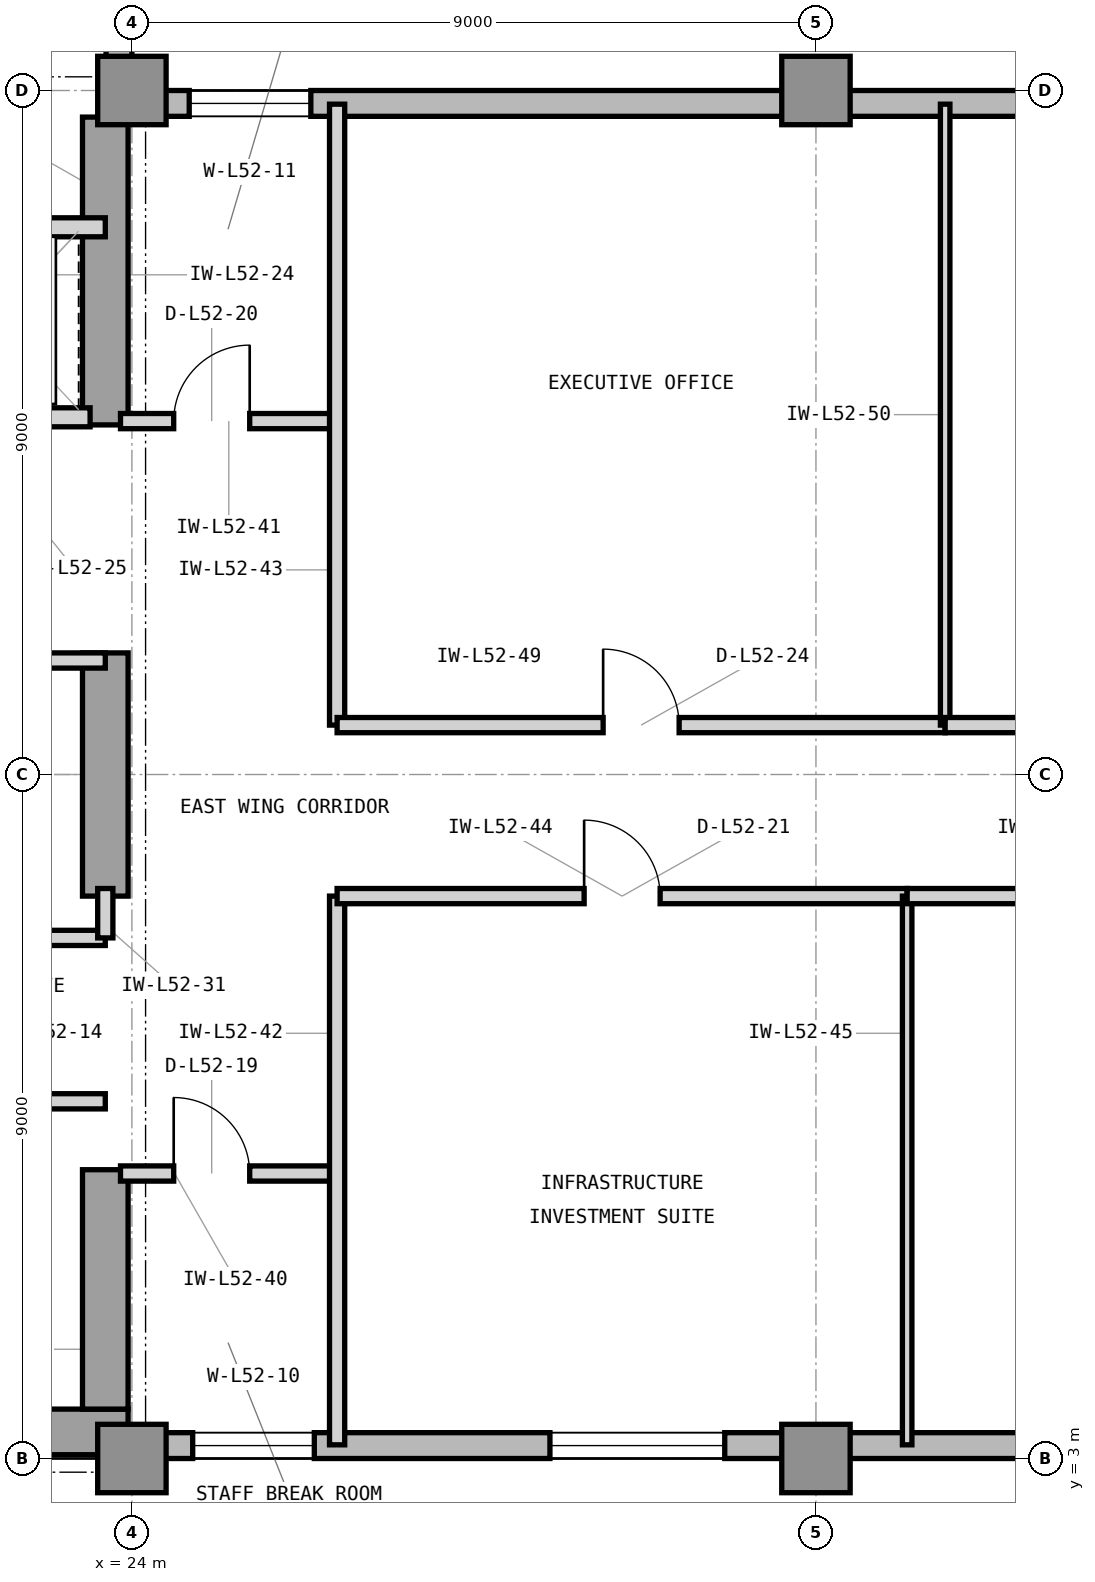
"""IFC4 building model, lengths in metres.
Left out: names, types, materials, properties, quantities, classifications, styles, units other than length and angle.
Written with IfcOpenShell. Run it as: python <this file> out.ifc"""

import sys

from ifc_helpers import new_model, si_unit, direction, frame, frame_2d, origin, origin_2d, place, context, subcontext, project, spatial, rectangle, extrude, element, fill, save


model = new_model("IFC4")
c1 = context("Model", 3, precision=1e-05, world=origin(), true_north=direction((0.0, 1.0)))
c2 = subcontext(c1, "Body", "Model", "MODEL_VIEW")
j1 = project(units=[si_unit("LENGTHUNIT", "METRE"), si_unit("PLANEANGLEUNIT", "RADIAN")], contexts=[c1])
p1 = place(None, origin())
s1 = spatial("IfcSite", under=j1, at=p1, CompositionType="ELEMENT")
p2 = place(p1, origin())
s2 = spatial("IfcBuilding", under=s1, at=p2, CompositionType="ELEMENT")
p3 = place(p2, frame((0.0, 0.0, 215.1)))
s3 = spatial("IfcBuildingStorey", under=s2, at=p3, CompositionType="ELEMENT", Elevation=215.1)
p4 = place(p3, frame((7.475, 3.35, 0.0), z_axis=(0.0, 0.0, 1.0), x_axis=(1.0, 0.0, 0.0)))
e1 = element("IfcWall", 1, at=p4, inside=s3, PredefinedType="SHEAR", context=c2, shape_type="SweptSolid", body=[
    extrude(rectangle(XDim=16.475, YDim=0.6, at=frame_2d((8.237, 0.0))), origin(), (0.0, 0.0, 1.0), 3.9),
])
p5 = place(p3, frame((23.65, 3.65, 0.0), z_axis=(0.0, 0.0, 1.0), x_axis=(0.0, 1.0, 0.0)))
e2 = element("IfcWall", 2, at=p5, inside=s3, PredefinedType="SHEAR", context=c2, shape_type="SweptSolid", body=[
    extrude(rectangle(XDim=3.15, YDim=0.6, at=frame_2d((1.575, 0.0))), origin(), (0.0, 0.0, 1.0), 3.9),
])
p6 = place(p3, frame((23.65, 10.4, 0.0), z_axis=(0.0, 0.0, 1.0), x_axis=(0.0, 1.0, 0.0)))
e3 = element("IfcWall", 3, at=p6, inside=s3, PredefinedType="SHEAR", context=c2, shape_type="SweptSolid", body=[
    extrude(rectangle(XDim=3.2, YDim=0.6, at=frame_2d((1.6, 0.0))), origin(), (0.0, 0.0, 1.0), 3.9),
])
p7 = place(p3, frame((23.65, 16.6, 0.0), z_axis=(0.0, 0.0, 1.0), x_axis=(0.0, 1.0, 0.0)))
e4 = element("IfcWall", 4, at=p7, inside=s3, PredefinedType="SHEAR", context=c2, shape_type="SweptSolid", body=[
    extrude(rectangle(XDim=4.05, YDim=0.6, at=frame_2d((2.025, 0.0))), origin(), (0.0, 0.0, 1.0), 3.9),
])
for number, where, z_axis, x_axis in (
    (5, (24.0, 3.0, 0.0), (0.0, 0.0, 1.0), (1.0, 0.0, 0.0)),
    (6, (24.0, 21.0, 0.0), (0.0, 0.0, 1.0), (1.0, 0.0, 0.0)),
    (7, (33.0, 3.0, 0.0), (0.0, 0.0, 1.0), (1.0, 0.0, 0.0)),
    (8, (33.0, 21.0, 0.0), (0.0, 0.0, 1.0), (1.0, 0.0, 0.0)),
):
    element("IfcColumn", number, at=place(p3, frame(where, z_axis=z_axis, x_axis=x_axis)), inside=s3, PredefinedType="COLUMN", context=c2, shape_type="SweptSolid", body=[
        extrude(rectangle(XDim=0.9, YDim=0.9, at=origin_2d()), origin(), (0.0, 0.0, 1.0), 3.9),
    ])
p8 = place(p3, frame((23.9, 3.17, 0.0), z_axis=(0.0, 0.0, 1.0), x_axis=(1.0, 0.0, 0.0)))
e9 = element("IfcWall", 9, at=p8, inside=s3, PredefinedType="STANDARD", context=c2, shape_type="SweptSolid", body=[
    extrude(rectangle(XDim=31.5, YDim=0.34, at=frame_2d((15.75, 0.0))), origin(), (0.0, 0.0, 1.0), 3.7),
])
p9 = place(p8, frame((5.6, 0.0, 0.9)))
e10 = element("IfcOpeningElement", 10, at=p9, cuts=e9, PredefinedType="OPENING", context=c2, shape_type="SweptSolid", body=[
    extrude(rectangle(XDim=2.3, YDim=2.2, at=frame_2d((1.15, 1.1))), frame((0.0, 0.18, 0.0), z_axis=(0.0, -1.0, 0.0), x_axis=(1.0, 0.0, 0.0)), (0.0, 0.0, 1.0), 0.36),
])
p10 = place(p8, frame((14.6, 0.0, 0.9)))
e11 = element("IfcOpeningElement", 11, at=p10, cuts=e9, PredefinedType="OPENING", context=c2, shape_type="SweptSolid", body=[
    extrude(rectangle(XDim=2.3, YDim=2.2, at=frame_2d((1.15, 1.1))), frame((0.0, 0.18, 0.0), z_axis=(0.0, -1.0, 0.0), x_axis=(1.0, 0.0, 0.0)), (0.0, 0.0, 1.0), 0.36),
])
p11 = place(p8, frame((19.1, 0.0, 0.9)))
e12 = element("IfcOpeningElement", 12, at=p11, cuts=e9, PredefinedType="OPENING", context=c2, shape_type="SweptSolid", body=[
    extrude(rectangle(XDim=2.3, YDim=2.2, at=frame_2d((1.15, 1.1))), frame((0.0, 0.18, 0.0), z_axis=(0.0, -1.0, 0.0), x_axis=(1.0, 0.0, 0.0)), (0.0, 0.0, 1.0), 0.36),
])
p12 = place(p8, frame((0.9, 0.0, 0.9)))
e13 = element("IfcOpeningElement", 13, at=p12, cuts=e9, PredefinedType="OPENING", context=c2, shape_type="SweptSolid", body=[
    extrude(rectangle(XDim=1.6, YDim=2.2, at=frame_2d((0.8, 1.1))), frame((0.0, 0.18, 0.0), z_axis=(0.0, -1.0, 0.0), x_axis=(1.0, 0.0, 0.0)), (0.0, 0.0, 1.0), 0.36),
])
p13 = place(p3, frame((55.4, 20.83, 0.0), z_axis=(0.0, 0.0, 1.0), x_axis=(-1.0, 0.0, 0.0)))
e14 = element("IfcWall", 14, at=p13, inside=s3, PredefinedType="STANDARD", context=c2, shape_type="SweptSolid", body=[
    extrude(rectangle(XDim=31.4, YDim=0.34, at=frame_2d((15.7, 0.0))), origin(), (0.0, 0.0, 1.0), 3.7),
])
p14 = place(p13, frame((17.167, 0.0, 0.9)))
e15 = element("IfcOpeningElement", 15, at=p14, cuts=e14, PredefinedType="OPENING", context=c2, shape_type="SweptSolid", body=[
    extrude(rectangle(XDim=2.3, YDim=2.2, at=frame_2d((1.15, 1.1))), frame((0.0, 0.18, 0.0), z_axis=(0.0, -1.0, 0.0), x_axis=(1.0, 0.0, 0.0)), (0.0, 0.0, 1.0), 0.36),
])
p15 = place(p13, frame((29.046, 0.0, 0.9)))
e16 = element("IfcOpeningElement", 16, at=p15, cuts=e14, PredefinedType="OPENING", context=c2, shape_type="SweptSolid", body=[
    extrude(rectangle(XDim=1.6, YDim=2.2, at=frame_2d((0.8, 1.1))), frame((0.0, 0.18, 0.0), z_axis=(0.0, -1.0, 0.0), x_axis=(1.0, 0.0, 0.0)), (0.0, 0.0, 1.0), 0.36),
])
p16 = place(p13, frame((8.925, 0.0, 0.9)))
e17 = element("IfcOpeningElement", 17, at=p16, cuts=e14, PredefinedType="OPENING", context=c2, shape_type="SweptSolid", body=[
    extrude(rectangle(XDim=2.3, YDim=2.2, at=frame_2d((1.15, 1.1))), frame((0.0, 0.18, 0.0), z_axis=(0.0, -1.0, 0.0), x_axis=(1.0, 0.0, 0.0)), (0.0, 0.0, 1.0), 0.36),
])
p17 = place(p3, frame((23.83, 21.0, 0.0), z_axis=(0.0, 0.0, 1.0), x_axis=(0.0, 1.0, 0.0)))
e18 = element("IfcWall", 18, at=p17, inside=s3, PredefinedType="STANDARD", context=c2, shape_type="SweptSolid", body=[
    extrude(rectangle(XDim=19.4, YDim=0.34, at=frame_2d((9.7, 0.0))), origin(), (0.0, 0.0, 1.0), 3.7),
])
p18 = place(p17, frame((10.975, 0.0, 0.9)))
e19 = element("IfcOpeningElement", 19, at=p18, cuts=e18, PredefinedType="OPENING", context=c2, shape_type="SweptSolid", body=[
    extrude(rectangle(XDim=2.3, YDim=2.2, at=frame_2d((1.15, 1.1))), frame((0.0, 0.18, 0.0), z_axis=(0.0, -1.0, 0.0), x_axis=(1.0, 0.0, 0.0)), (0.0, 0.0, 1.0), 0.36),
])
p19 = place(p3, frame((21.05, 16.7, 0.0), z_axis=(0.0, 0.0, 1.0), x_axis=(1.0, 0.0, 0.0)))
e20 = element("IfcWall", 20, at=p19, inside=s3, PredefinedType="PARTITIONING", context=c2, shape_type="SweptSolid", body=[
    extrude(rectangle(XDim=2.4, YDim=0.25, at=frame_2d((1.2, 0.0))), origin(), (0.0, 0.0, 1.0), 3.283),
])
p20 = place(p19, frame((0.52, 0.0, 0.0)))
e21 = element("IfcOpeningElement", 21, at=p20, cuts=e20, PredefinedType="OPENING", context=c2, shape_type="SweptSolid", body=[
    extrude(rectangle(XDim=1.15, YDim=2.25, at=frame_2d((0.575, 1.125))), frame((0.0, 0.135, 0.0), z_axis=(0.0, -1.0, 0.0), x_axis=(1.0, 0.0, 0.0)), (0.0, 0.0, 1.0), 0.27),
])
p21 = place(p3, frame((16.45, 19.2, 0.0), z_axis=(0.0, 0.0, 1.0), x_axis=(1.0, 0.0, 0.0)))
e22 = element("IfcWall", 22, at=p21, inside=s3, PredefinedType="PARTITIONING", context=c2, shape_type="SweptSolid", body=[
    extrude(rectangle(XDim=7.2, YDim=0.25, at=frame_2d((3.6, 0.0))), origin(), (0.0, 0.0, 1.0), 3.69),
])
p22 = place(p3, frame((19.15, 7.7, 0.0), z_axis=(0.0, 0.0, 1.0), x_axis=(1.0, 0.0, 0.0)))
e23 = element("IfcWall", 23, at=p22, inside=s3, PredefinedType="PARTITIONING", context=c2, shape_type="SweptSolid", body=[
    extrude(rectangle(XDim=4.5, YDim=0.2, at=frame_2d((2.25, 0.0))), origin(), (0.0, 0.0, 1.0), 3.69),
])
p23 = place(p22, frame((1.75, 0.0, 0.0)))
e24 = element("IfcOpeningElement", 24, at=p23, cuts=e23, PredefinedType="OPENING", context=c2, shape_type="SweptSolid", body=[
    extrude(rectangle(XDim=1.0, YDim=2.15, at=frame_2d((0.5, 1.075))), frame((0.0, 0.11, 0.0), z_axis=(0.0, -1.0, 0.0), x_axis=(1.0, 0.0, 0.0)), (0.0, 0.0, 1.0), 0.22),
])
p24 = place(p3, frame((14.825, 9.85, 0.0), z_axis=(0.0, 0.0, 1.0), x_axis=(1.0, 0.0, 0.0)))
e25 = element("IfcWall", 25, at=p24, inside=s3, PredefinedType="PARTITIONING", context=c2, shape_type="SweptSolid", body=[
    extrude(rectangle(XDim=8.825, YDim=0.2, at=frame_2d((4.413, 0.0))), origin(), (0.0, 0.0, 1.0), 3.69),
])
p25 = place(p3, frame((23.65, 9.85, 0.0), z_axis=(0.0, 0.0, 1.0), x_axis=(0.0, 1.0, 0.0)))
e26 = element("IfcWall", 26, at=p25, inside=s3, PredefinedType="PARTITIONING", context=c2, shape_type="SweptSolid", body=[
    extrude(rectangle(XDim=0.65, YDim=0.2, at=frame_2d((0.325, 0.0))), origin(), (0.0, 0.0, 1.0), 3.69),
])
p26 = place(p3, frame((19.85, 13.5, 0.0), z_axis=(0.0, 0.0, 1.0), x_axis=(1.0, 0.0, 0.0)))
e27 = element("IfcWall", 27, at=p26, inside=s3, PredefinedType="PARTITIONING", context=c2, shape_type="SweptSolid", body=[
    extrude(rectangle(XDim=3.8, YDim=0.2, at=frame_2d((1.9, 0.0))), origin(), (0.0, 0.0, 1.0), 3.283),
])
p27 = place(p26, frame((1.425, 0.0, 0.0)))
e28 = element("IfcOpeningElement", 28, at=p27, cuts=e27, PredefinedType="OPENING", context=c2, shape_type="SweptSolid", body=[
    extrude(rectangle(XDim=0.95, YDim=2.1, at=frame_2d((0.475, 1.05))), frame((0.0, 0.11, 0.0), z_axis=(0.0, -1.0, 0.0), x_axis=(1.0, 0.0, 0.0)), (0.0, 0.0, 1.0), 0.22),
])
p28 = place(p3, frame((23.85, 6.75, 0.0), z_axis=(0.0, 0.0, 1.0), x_axis=(1.0, 0.0, 0.0)))
e29 = element("IfcWall", 29, at=p28, inside=s3, PredefinedType="PARTITIONING", context=c2, shape_type="SweptSolid", body=[
    extrude(rectangle(XDim=2.85, YDim=0.2, at=frame_2d((1.425, 0.0))), origin(), (0.0, 0.0, 1.0), 3.69),
])
p29 = place(p28, frame((0.7, 0.0, 0.0)))
e30 = element("IfcOpeningElement", 30, at=p29, cuts=e29, PredefinedType="OPENING", context=c2, shape_type="SweptSolid", body=[
    extrude(rectangle(XDim=1.0, YDim=2.15, at=frame_2d((0.5, 1.075))), frame((0.0, 0.11, 0.0), z_axis=(0.0, -1.0, 0.0), x_axis=(1.0, 0.0, 0.0)), (0.0, 0.0, 1.0), 0.22),
])
p30 = place(p3, frame((23.85, 16.65, 0.0), z_axis=(0.0, 0.0, 1.0), x_axis=(1.0, 0.0, 0.0)))
e31 = element("IfcWall", 31, at=p30, inside=s3, PredefinedType="PARTITIONING", context=c2, shape_type="SweptSolid", body=[
    extrude(rectangle(XDim=2.85, YDim=0.2, at=frame_2d((1.425, 0.0))), origin(), (0.0, 0.0, 1.0), 3.69),
])
p31 = place(p30, frame((0.7, 0.0, 0.0)))
e32 = element("IfcOpeningElement", 32, at=p31, cuts=e31, PredefinedType="OPENING", context=c2, shape_type="SweptSolid", body=[
    extrude(rectangle(XDim=1.0, YDim=2.15, at=frame_2d((0.5, 1.075))), frame((0.0, 0.11, 0.0), z_axis=(0.0, -1.0, 0.0), x_axis=(1.0, 0.0, 0.0)), (0.0, 0.0, 1.0), 0.22),
])
p32 = place(p3, frame((26.7, 3.18, 0.0), z_axis=(0.0, 0.0, 1.0), x_axis=(0.0, 1.0, 0.0)))
e33 = element("IfcWall", 33, at=p32, inside=s3, PredefinedType="PARTITIONING", context=c2, shape_type="SweptSolid", body=[
    extrude(rectangle(XDim=7.22, YDim=0.2, at=frame_2d((3.61, 0.0))), origin(), (0.0, 0.0, 1.0), 3.69),
])
p33 = place(p3, frame((26.7, 12.65, 0.0), z_axis=(0.0, 0.0, 1.0), x_axis=(0.0, 1.0, 0.0)))
e34 = element("IfcWall", 34, at=p33, inside=s3, PredefinedType="PARTITIONING", context=c2, shape_type="SweptSolid", body=[
    extrude(rectangle(XDim=8.17, YDim=0.2, at=frame_2d((4.085, 0.0))), origin(), (0.0, 0.0, 1.0), 3.69),
])
p34 = place(p3, frame((26.7, 10.4, 0.0), z_axis=(0.0, 0.0, 1.0), x_axis=(1.0, 0.0, 0.0)))
e35 = element("IfcWall", 35, at=p34, inside=s3, PredefinedType="PARTITIONING", context=c2, shape_type="SweptSolid", body=[
    extrude(rectangle(XDim=7.5, YDim=0.2, at=frame_2d((3.75, 0.0))), origin(), (0.0, 0.0, 1.0), 3.69),
])
p35 = place(p34, frame((3.25, 0.0, 0.0)))
e36 = element("IfcOpeningElement", 36, at=p35, cuts=e35, PredefinedType="OPENING", context=c2, shape_type="SweptSolid", body=[
    extrude(rectangle(XDim=1.0, YDim=2.15, at=frame_2d((0.5, 1.075))), frame((0.0, 0.11, 0.0), z_axis=(0.0, -1.0, 0.0), x_axis=(1.0, 0.0, 0.0)), (0.0, 0.0, 1.0), 0.22),
])
p36 = place(p3, frame((34.2, 3.18, 0.0), z_axis=(0.0, 0.0, 1.0), x_axis=(0.0, 1.0, 0.0)))
e37 = element("IfcWall", 37, at=p36, inside=s3, PredefinedType="PARTITIONING", context=c2, shape_type="SweptSolid", body=[
    extrude(rectangle(XDim=7.22, YDim=0.125, at=frame_2d((3.61, 0.0))), origin(), (0.0, 0.0, 1.0), 3.69),
])
p37 = place(p3, frame((34.2, 10.4, 0.0), z_axis=(0.0, 0.0, 1.0), x_axis=(1.0, 0.0, 0.0)))
e38 = element("IfcWall", 38, at=p37, inside=s3, PredefinedType="PARTITIONING", context=c2, shape_type="SweptSolid", body=[
    extrude(rectangle(XDim=7.5, YDim=0.2, at=frame_2d((3.75, 0.0))), origin(), (0.0, 0.0, 1.0), 3.69),
])
p38 = place(p37, frame((3.0, 0.0, 0.0)))
e39 = element("IfcOpeningElement", 39, at=p38, cuts=e38, PredefinedType="OPENING", context=c2, shape_type="SweptSolid", body=[
    extrude(rectangle(XDim=1.5, YDim=2.3, at=frame_2d((0.75, 1.15))), frame((0.0, 0.11, 0.0), z_axis=(0.0, -1.0, 0.0), x_axis=(1.0, 0.0, 0.0)), (0.0, 0.0, 1.0), 0.22),
])
p39 = place(p3, frame((26.7, 12.65, 0.0), z_axis=(0.0, 0.0, 1.0), x_axis=(1.0, 0.0, 0.0)))
e40 = element("IfcWall", 40, at=p39, inside=s3, PredefinedType="PARTITIONING", context=c2, shape_type="SweptSolid", body=[
    extrude(rectangle(XDim=8.0, YDim=0.2, at=frame_2d((4.0, 0.0))), origin(), (0.0, 0.0, 1.0), 3.69),
])
p40 = place(p39, frame((3.5, 0.0, 0.0)))
e41 = element("IfcOpeningElement", 41, at=p40, cuts=e40, PredefinedType="OPENING", context=c2, shape_type="SweptSolid", body=[
    extrude(rectangle(XDim=1.0, YDim=2.15, at=frame_2d((0.5, 1.075))), frame((0.0, 0.11, 0.0), z_axis=(0.0, -1.0, 0.0), x_axis=(1.0, 0.0, 0.0)), (0.0, 0.0, 1.0), 0.22),
])
p41 = place(p3, frame((34.7, 12.65, 0.0), z_axis=(0.0, 0.0, 1.0), x_axis=(0.0, 1.0, 0.0)))
e42 = element("IfcWall", 42, at=p41, inside=s3, PredefinedType="PARTITIONING", context=c2, shape_type="SweptSolid", body=[
    extrude(rectangle(XDim=8.17, YDim=0.125, at=frame_2d((4.085, 0.0))), origin(), (0.0, 0.0, 1.0), 3.69),
])
p42 = place(p3, frame((34.7, 12.65, 0.0), z_axis=(0.0, 0.0, 1.0), x_axis=(1.0, 0.0, 0.0)))
e43 = element("IfcWall", 43, at=p42, inside=s3, PredefinedType="PARTITIONING", context=c2, shape_type="SweptSolid", body=[
    extrude(rectangle(XDim=8.0, YDim=0.2, at=frame_2d((4.0, 0.0))), origin(), (0.0, 0.0, 1.0), 3.69),
])
p43 = place(p42, frame((3.5, 0.0, 0.0)))
e44 = element("IfcOpeningElement", 44, at=p43, cuts=e43, PredefinedType="OPENING", context=c2, shape_type="SweptSolid", body=[
    extrude(rectangle(XDim=1.0, YDim=2.15, at=frame_2d((0.5, 1.075))), frame((0.0, 0.11, 0.0), z_axis=(0.0, -1.0, 0.0), x_axis=(1.0, 0.0, 0.0)), (0.0, 0.0, 1.0), 0.22),
])
p44 = place(p9, origin())
e45 = element("IfcWindow", 45, at=p44, inside=s3, PartitioningType="SINGLE_PANEL", PredefinedType="WINDOW", context=c2, shape_type="SweptSolid", body=[
    extrude(rectangle(XDim=2.3, YDim=2.2, at=frame_2d((1.15, 1.1))), frame((0.0, 0.11, 0.0), z_axis=(0.0, -1.0, 0.0), x_axis=(1.0, 0.0, 0.0)), (0.0, 0.0, 1.0), 0.06),
])
fill(e10, e45)
p45 = place(p29, origin())
e46 = element("IfcDoor", 46, at=p45, inside=s3, OperationType="SINGLE_SWING_LEFT", PredefinedType="DOOR", context=c2, shape_type="SweptSolid", body=[
    extrude(rectangle(XDim=1.0, YDim=2.15, at=frame_2d((0.5, 1.075))), frame((0.0, 0.025, 0.0), z_axis=(0.0, -1.0, 0.0), x_axis=(1.0, 0.0, 0.0)), (0.0, 0.0, 1.0), 0.05),
])
fill(e30, e46)
p46 = place(p31, origin())
e47 = element("IfcDoor", 47, at=p46, inside=s3, OperationType="SINGLE_SWING_RIGHT", PredefinedType="DOOR", context=c2, shape_type="SweptSolid", body=[
    extrude(rectangle(XDim=1.0, YDim=2.15, at=frame_2d((0.5, 1.075))), frame((0.0, 0.025, 0.0), z_axis=(0.0, -1.0, 0.0), x_axis=(1.0, 0.0, 0.0)), (0.0, 0.0, 1.0), 0.05),
])
fill(e32, e47)
p47 = place(p35, origin())
e48 = element("IfcDoor", 48, at=p47, inside=s3, OperationType="SINGLE_SWING_LEFT", PredefinedType="DOOR", context=c2, shape_type="SweptSolid", body=[
    extrude(rectangle(XDim=1.0, YDim=2.15, at=frame_2d((0.5, 1.075))), frame((0.0, 0.025, 0.0), z_axis=(0.0, -1.0, 0.0), x_axis=(1.0, 0.0, 0.0)), (0.0, 0.0, 1.0), 0.05),
])
fill(e36, e48)
p48 = place(p40, origin())
e49 = element("IfcDoor", 49, at=p48, inside=s3, OperationType="SINGLE_SWING_LEFT", PredefinedType="DOOR", context=c2, shape_type="SweptSolid", body=[
    extrude(rectangle(XDim=1.0, YDim=2.15, at=frame_2d((0.5, 1.075))), frame((0.0, 0.025, 0.0), z_axis=(0.0, -1.0, 0.0), x_axis=(1.0, 0.0, 0.0)), (0.0, 0.0, 1.0), 0.05),
])
fill(e41, e49)
p49 = place(p12, origin())
e50 = element("IfcWindow", 50, at=p49, inside=s3, PartitioningType="SINGLE_PANEL", PredefinedType="WINDOW", context=c2, shape_type="SweptSolid", body=[
    extrude(rectangle(XDim=1.6, YDim=2.2, at=frame_2d((0.8, 1.1))), frame((0.0, 0.11, 0.0), z_axis=(0.0, -1.0, 0.0), x_axis=(1.0, 0.0, 0.0)), (0.0, 0.0, 1.0), 0.06),
])
fill(e13, e50)
p50 = place(p15, origin())
e51 = element("IfcWindow", 51, at=p50, inside=s3, PartitioningType="SINGLE_PANEL", PredefinedType="WINDOW", context=c2, shape_type="SweptSolid", body=[
    extrude(rectangle(XDim=1.6, YDim=2.2, at=frame_2d((0.8, 1.1))), frame((0.0, 0.11, 0.0), z_axis=(0.0, -1.0, 0.0), x_axis=(1.0, 0.0, 0.0)), (0.0, 0.0, 1.0), 0.06),
])
fill(e16, e51)
save(model, sys.argv[1])
